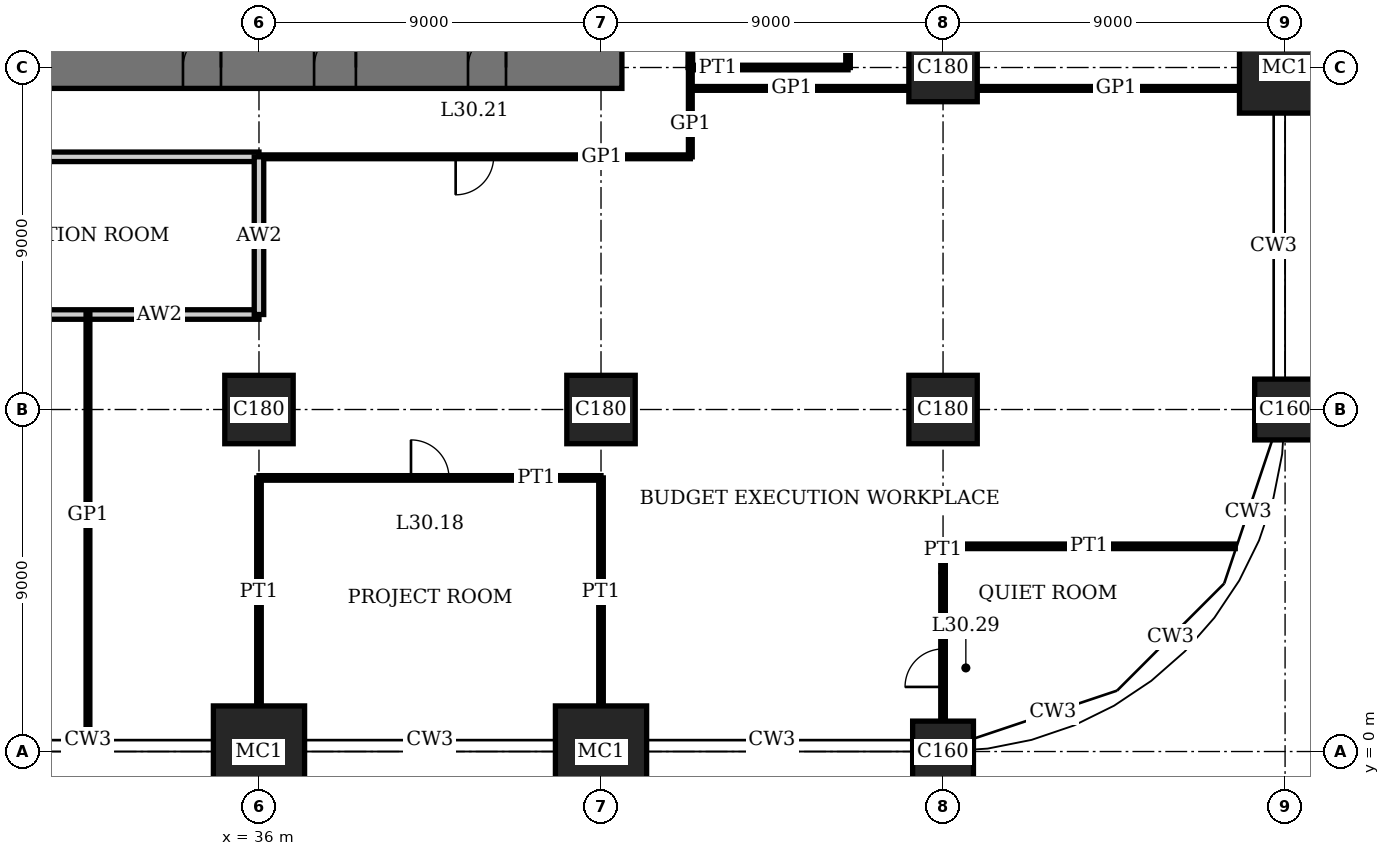
"""IFC4 building model, lengths in metres.
Left out: names, types, materials, properties, quantities, classifications, styles, units other than length and angle.
Written with IfcOpenShell. Run it as: python <this file> out.ifc"""

import sys

from ifc_helpers import new_model, si_unit, direction, frame, frame_2d, origin, origin_2d, place, context, subcontext, project, spatial, rectangle, extrude, element, fill, save


model = new_model("IFC4")
c1 = context("Model", 3, precision=1e-05, world=origin(), true_north=direction((0.0, 1.0)))
c2 = subcontext(c1, "Body", "Model", "MODEL_VIEW")
j1 = project(units=[si_unit("LENGTHUNIT", "METRE"), si_unit("PLANEANGLEUNIT", "RADIAN")], contexts=[c1])
p1 = place(None, origin())
s1 = spatial("IfcSite", under=j1, at=p1, CompositionType="ELEMENT")
p2 = place(p1, origin())
s2 = spatial("IfcBuilding", under=s1, at=p2, CompositionType="ELEMENT")
p3 = place(p2, frame((0.0, 0.0, 125.0)))
s3 = spatial("IfcBuildingStorey", under=s2, at=p3, CompositionType="ELEMENT", Elevation=125.0)
p4 = place(p3, frame((36.0, 0.0, 0.0), z_axis=(0.0, 0.0, 1.0), x_axis=(1.0, 0.0, 0.0)))
e1 = element("IfcColumn", 1, at=p4, inside=s3, PredefinedType="COLUMN", context=c2, shape_type="SweptSolid", body=[
    extrude(rectangle(XDim=2.4, YDim=2.4, at=origin_2d()), origin(), (0.0, 0.0, 1.0), 4.0),
])
p5 = place(p3, frame((36.0, 9.0, 0.0), z_axis=(0.0, 0.0, 1.0), x_axis=(1.0, 0.0, 0.0)))
e2 = element("IfcColumn", 2, at=p5, inside=s3, PredefinedType="COLUMN", context=c2, shape_type="SweptSolid", body=[
    extrude(rectangle(XDim=1.8, YDim=1.8, at=origin_2d()), origin(), (0.0, 0.0, 1.0), 4.0),
])
p6 = place(p3, frame((45.0, 0.0, 0.0), z_axis=(0.0, 0.0, 1.0), x_axis=(1.0, 0.0, 0.0)))
e3 = element("IfcColumn", 3, at=p6, inside=s3, PredefinedType="COLUMN", context=c2, shape_type="SweptSolid", body=[
    extrude(rectangle(XDim=2.4, YDim=2.4, at=origin_2d()), origin(), (0.0, 0.0, 1.0), 4.0),
])
p7 = place(p3, frame((45.0, 9.0, 0.0), z_axis=(0.0, 0.0, 1.0), x_axis=(1.0, 0.0, 0.0)))
e4 = element("IfcColumn", 4, at=p7, inside=s3, PredefinedType="COLUMN", context=c2, shape_type="SweptSolid", body=[
    extrude(rectangle(XDim=1.8, YDim=1.8, at=origin_2d()), origin(), (0.0, 0.0, 1.0), 4.0),
])
p8 = place(p3, frame((54.0, 0.0, 0.0), z_axis=(0.0, 0.0, 1.0), x_axis=(1.0, 0.0, 0.0)))
e5 = element("IfcColumn", 5, at=p8, inside=s3, PredefinedType="COLUMN", context=c2, shape_type="SweptSolid", body=[
    extrude(rectangle(XDim=1.6, YDim=1.6, at=origin_2d()), origin(), (0.0, 0.0, 1.0), 4.0),
])
for number, where, z_axis, x_axis in (
    (6, (54.0, 9.0, 0.0), (0.0, 0.0, 1.0), (1.0, 0.0, 0.0)),
    (7, (54.0, 18.0, 0.0), (0.0, 0.0, 1.0), (1.0, 0.0, 0.0)),
):
    element("IfcColumn", number, at=place(p3, frame(where, z_axis=z_axis, x_axis=x_axis)), inside=s3, PredefinedType="COLUMN", context=c2, shape_type="SweptSolid", body=[
        extrude(rectangle(XDim=1.8, YDim=1.8, at=origin_2d()), origin(), (0.0, 0.0, 1.0), 4.0),
    ])
p9 = place(p3, frame((63.0, 9.0, 0.0), z_axis=(0.0, 0.0, 1.0), x_axis=(1.0, 0.0, 0.0)))
e8 = element("IfcColumn", 8, at=p9, inside=s3, PredefinedType="COLUMN", context=c2, shape_type="SweptSolid", body=[
    extrude(rectangle(XDim=1.6, YDim=1.6, at=origin_2d()), origin(), (0.0, 0.0, 1.0), 4.0),
])
p10 = place(p3, frame((63.0, 18.0, 0.0), z_axis=(0.0, 0.0, 1.0), x_axis=(1.0, 0.0, 0.0)))
e9 = element("IfcColumn", 9, at=p10, inside=s3, PredefinedType="COLUMN", context=c2, shape_type="SweptSolid", body=[
    extrude(rectangle(XDim=2.4, YDim=2.4, at=origin_2d()), origin(), (0.0, 0.0, 1.0), 4.0),
])
p11 = place(p3, frame((17.45, 18.0, 0.0), z_axis=(0.0, 0.0, 1.0), x_axis=(1.0, 0.0, 0.0)))
e10 = element("IfcWall", 10, at=p11, inside=s3, PredefinedType="SHEAR", context=c2, shape_type="SweptSolid", body=[
    extrude(rectangle(XDim=28.1, YDim=1.1, at=frame_2d((14.05, 0.0))), origin(), (0.0, 0.0, 1.0), 4.0),
])
p12 = place(p11, frame((11.55, 0.0, 0.0)))
e11 = element("IfcOpeningElement", 11, at=p12, cuts=e10, PredefinedType="OPENING", context=c2, shape_type="SweptSolid", body=[
    extrude(rectangle(XDim=1.0, YDim=2.4, at=frame_2d((0.5, 1.2))), frame((0.0, 0.56, 0.0), z_axis=(0.0, -1.0, 0.0), x_axis=(1.0, 0.0, 0.0)), (0.0, 0.0, 1.0), 1.12),
])
p13 = place(p11, frame((16.55, 0.0, 0.0)))
e12 = element("IfcOpeningElement", 12, at=p13, cuts=e10, PredefinedType="OPENING", context=c2, shape_type="SweptSolid", body=[
    extrude(rectangle(XDim=1.0, YDim=2.4, at=frame_2d((0.5, 1.2))), frame((0.0, 0.56, 0.0), z_axis=(0.0, -1.0, 0.0), x_axis=(1.0, 0.0, 0.0)), (0.0, 0.0, 1.0), 1.12),
])
p14 = place(p11, frame((20.0, 0.0, 0.0)))
e13 = element("IfcOpeningElement", 13, at=p14, cuts=e10, PredefinedType="OPENING", context=c2, shape_type="SweptSolid", body=[
    extrude(rectangle(XDim=1.1, YDim=2.4, at=frame_2d((0.55, 1.2))), frame((0.0, 0.56, 0.0), z_axis=(0.0, -1.0, 0.0), x_axis=(1.0, 0.0, 0.0)), (0.0, 0.0, 1.0), 1.12),
])
p15 = place(p11, frame((24.05, 0.0, 0.0)))
e14 = element("IfcOpeningElement", 14, at=p15, cuts=e10, PredefinedType="OPENING", context=c2, shape_type="SweptSolid", body=[
    extrude(rectangle(XDim=1.0, YDim=2.4, at=frame_2d((0.5, 1.2))), frame((0.0, 0.56, 0.0), z_axis=(0.0, -1.0, 0.0), x_axis=(1.0, 0.0, 0.0)), (0.0, 0.0, 1.0), 1.12),
])
p16 = place(p3, frame((54.0, 5.4, 0.0), z_axis=(0.0, 0.0, 1.0), x_axis=(1.0, 0.0, 0.0)))
e15 = element("IfcWall", 15, at=p16, inside=s3, PredefinedType="PARTITIONING", context=c2, shape_type="SweptSolid", body=[
    extrude(rectangle(XDim=7.688, YDim=0.12, at=frame_2d((3.844, 0.0))), origin(), (0.0, 0.0, 1.0), 3.75),
])
p17 = place(p3, frame((36.0, 7.2, 0.0), z_axis=(0.0, 0.0, 1.0), x_axis=(1.0, 0.0, 0.0)))
e16 = element("IfcWall", 16, at=p17, inside=s3, PredefinedType="PARTITIONING", context=c2, shape_type="SweptSolid", body=[
    extrude(rectangle(XDim=9.0, YDim=0.12, at=frame_2d((4.5, 0.0))), origin(), (0.0, 0.0, 1.0), 3.75),
])
p18 = place(p17, frame((4.0, 0.0, 0.0)))
e17 = element("IfcOpeningElement", 17, at=p18, cuts=e16, PredefinedType="OPENING", context=c2, shape_type="SweptSolid", body=[
    extrude(rectangle(XDim=1.0, YDim=2.4, at=frame_2d((0.5, 1.2))), frame((0.0, 0.07, 0.0), z_axis=(0.0, -1.0, 0.0), x_axis=(1.0, 0.0, 0.0)), (0.0, 0.0, 1.0), 0.14),
])
p19 = place(p3, frame((22.5, 11.5, 0.0), z_axis=(0.0, 0.0, 1.0), x_axis=(1.0, 0.0, 0.0)))
e18 = element("IfcWall", 18, at=p19, inside=s3, PredefinedType="PARTITIONING", context=c2, shape_type="SweptSolid", body=[
    extrude(rectangle(XDim=13.5, YDim=0.25, at=frame_2d((6.75, 0.0))), origin(), (0.0, 0.0, 1.0), 3.75),
])
p20 = place(p19, frame((5.85, 0.0, 0.0)))
e19 = element("IfcOpeningElement", 19, at=p20, cuts=e18, PredefinedType="OPENING", context=c2, shape_type="SweptSolid", body=[
    extrude(rectangle(XDim=1.8, YDim=2.4, at=frame_2d((0.9, 1.2))), frame((0.0, 0.135, 0.0), z_axis=(0.0, -1.0, 0.0), x_axis=(1.0, 0.0, 0.0)), (0.0, 0.0, 1.0), 0.27),
])
p21 = place(p3, frame((22.5, 15.65, 0.0), z_axis=(0.0, 0.0, 1.0), x_axis=(1.0, 0.0, 0.0)))
e20 = element("IfcWall", 20, at=p21, inside=s3, PredefinedType="PARTITIONING", context=c2, shape_type="SweptSolid", body=[
    extrude(rectangle(XDim=13.5, YDim=0.25, at=frame_2d((6.75, 0.0))), origin(), (0.0, 0.0, 1.0), 3.75),
])
p22 = place(p3, frame((36.0, 15.65, 0.0), z_axis=(0.0, 0.0, 1.0), x_axis=(1.0, 0.0, 0.0)))
e21 = element("IfcWall", 21, at=p22, inside=s3, PredefinedType="PARTITIONING", context=c2, shape_type="SweptSolid", body=[
    extrude(rectangle(XDim=11.35, YDim=0.1, at=frame_2d((5.675, 0.0))), origin(), (0.0, 0.0, 1.0), 3.75),
])
p23 = place(p22, frame((5.175, 0.0, 0.0)))
e22 = element("IfcOpeningElement", 22, at=p23, cuts=e21, PredefinedType="OPENING", context=c2, shape_type="SweptSolid", body=[
    extrude(rectangle(XDim=1.0, YDim=2.4, at=frame_2d((0.5, 1.2))), frame((0.0, 0.06, 0.0), z_axis=(0.0, -1.0, 0.0), x_axis=(1.0, 0.0, 0.0)), (0.0, 0.0, 1.0), 0.12),
])
p24 = place(p3, frame((47.35, 17.45, 0.0), z_axis=(0.0, 0.0, 1.0), x_axis=(1.0, 0.0, 0.0)))
e23 = element("IfcWall", 23, at=p24, inside=s3, PredefinedType="PARTITIONING", context=c2, shape_type="SweptSolid", body=[
    extrude(rectangle(XDim=5.75, YDim=0.1, at=frame_2d((2.875, 0.0))), origin(), (0.0, 0.0, 1.0), 3.75),
])
p25 = place(p3, frame((54.9, 17.45, 0.0), z_axis=(0.0, 0.0, 1.0), x_axis=(1.0, 0.0, 0.0)))
e24 = element("IfcWall", 24, at=p25, inside=s3, PredefinedType="PARTITIONING", context=c2, shape_type="SweptSolid", body=[
    extrude(rectangle(XDim=6.9, YDim=0.1, at=frame_2d((3.45, 0.0))), origin(), (0.0, 0.0, 1.0), 3.75),
])
p26 = place(p3, frame((47.35, 18.0, 0.0), z_axis=(0.0, 0.0, 1.0), x_axis=(1.0, 0.0, 0.0)))
e25 = element("IfcWall", 25, at=p26, inside=s3, PredefinedType="PARTITIONING", context=c2, shape_type="SweptSolid", body=[
    extrude(rectangle(XDim=4.15, YDim=0.12, at=frame_2d((2.075, 0.0))), origin(), (0.0, 0.0, 1.0), 3.05),
])
p27 = place(p3, frame((31.5, 0.31, 0.0), z_axis=(0.0, 0.0, 1.0), x_axis=(0.0, 1.0, 0.0)))
e26 = element("IfcWall", 26, at=p27, inside=s3, PredefinedType="PARTITIONING", context=c2, shape_type="SweptSolid", body=[
    extrude(rectangle(XDim=11.2, YDim=0.1, at=frame_2d((5.6, 0.0))), origin(), (0.0, 0.0, 1.0), 3.75),
])
p28 = place(p3, frame((36.0, 11.5, 0.0), z_axis=(0.0, 0.0, 1.0), x_axis=(0.0, 1.0, 0.0)))
e27 = element("IfcWall", 27, at=p28, inside=s3, PredefinedType="PARTITIONING", context=c2, shape_type="SweptSolid", body=[
    extrude(rectangle(XDim=4.15, YDim=0.25, at=frame_2d((2.075, 0.0))), origin(), (0.0, 0.0, 1.0), 3.05),
])
for number, where, z_axis, x_axis in (
    (28, (36.0, 1.2, 0.0), (0.0, 0.0, 1.0), (0.0, 1.0, 0.0)),
    (29, (45.0, 1.2, 0.0), (0.0, 0.0, 1.0), (0.0, 1.0, 0.0)),
):
    element("IfcWall", number, at=place(p3, frame(where, z_axis=z_axis, x_axis=x_axis)), inside=s3, PredefinedType="PARTITIONING", context=c2, shape_type="SweptSolid", body=[
        extrude(rectangle(XDim=6.0, YDim=0.12, at=frame_2d((3.0, 0.0))), origin(), (0.0, 0.0, 1.0), 3.05),
    ])
p29 = place(p3, frame((47.35, 18.0, 0.0), z_axis=(0.0, 0.0, 1.0), x_axis=(0.0, 1.0, 0.0)))
e30 = element("IfcWall", 30, at=p29, inside=s3, PredefinedType="PARTITIONING", context=c2, shape_type="SweptSolid", body=[
    extrude(rectangle(XDim=4.5, YDim=0.12, at=frame_2d((2.25, 0.0))), origin(), (0.0, 0.0, 1.0), 3.75),
])
p30 = place(p3, frame((47.35, 15.65, 0.0), z_axis=(0.0, 0.0, 1.0), x_axis=(0.0, 1.0, 0.0)))
e31 = element("IfcWall", 31, at=p30, inside=s3, PredefinedType="PARTITIONING", context=c2, shape_type="SweptSolid", body=[
    extrude(rectangle(XDim=2.35, YDim=0.1, at=frame_2d((1.175, 0.0))), origin(), (0.0, 0.0, 1.0), 3.75),
])
p31 = place(p3, frame((51.5, 18.0, 0.0), z_axis=(0.0, 0.0, 1.0), x_axis=(0.0, 1.0, 0.0)))
e32 = element("IfcWall", 32, at=p31, inside=s3, PredefinedType="PARTITIONING", context=c2, shape_type="SweptSolid", body=[
    extrude(rectangle(XDim=4.5, YDim=0.12, at=frame_2d((2.25, 0.0))), origin(), (0.0, 0.0, 1.0), 3.75),
])
p32 = place(p31, frame((1.75, 0.0, 0.0)))
e33 = element("IfcOpeningElement", 33, at=p32, cuts=e32, PredefinedType="OPENING", context=c2, shape_type="SweptSolid", body=[
    extrude(rectangle(XDim=1.0, YDim=2.4, at=frame_2d((0.5, 1.2))), frame((0.0, 0.07, 0.0), z_axis=(0.0, -1.0, 0.0), x_axis=(1.0, 0.0, 0.0)), (0.0, 0.0, 1.0), 0.14),
])
p33 = place(p3, frame((54.0, 0.8, 0.0), z_axis=(0.0, 0.0, 1.0), x_axis=(0.0, 1.0, 0.0)))
e34 = element("IfcWall", 34, at=p33, inside=s3, PredefinedType="PARTITIONING", context=c2, shape_type="SweptSolid", body=[
    extrude(rectangle(XDim=4.6, YDim=0.12, at=frame_2d((2.3, 0.0))), origin(), (0.0, 0.0, 1.0), 3.05),
])
p34 = place(p33, frame((0.9, 0.0, 0.0)))
e35 = element("IfcOpeningElement", 35, at=p34, cuts=e34, PredefinedType="OPENING", context=c2, shape_type="SweptSolid", body=[
    extrude(rectangle(XDim=1.0, YDim=2.4, at=frame_2d((0.5, 1.2))), frame((0.0, 0.07, 0.0), z_axis=(0.0, -1.0, 0.0), x_axis=(1.0, 0.0, 0.0)), (0.0, 0.0, 1.0), 0.14),
])
p35 = place(p13, origin())
e36 = element("IfcDoor", 36, at=p35, inside=s3, OperationType="SINGLE_SWING_LEFT", PredefinedType="DOOR", context=c2, shape_type="SweptSolid", body=[
    extrude(rectangle(XDim=1.0, YDim=2.4, at=frame_2d((0.5, 1.2))), frame((0.0, 0.025, 0.0), z_axis=(0.0, -1.0, 0.0), x_axis=(1.0, 0.0, 0.0)), (0.0, 0.0, 1.0), 0.05),
    extrude(rectangle(XDim=0.04, YDim=2.4, at=frame_2d((0.02, 1.2))), frame((0.0, 0.4, 0.0), z_axis=(0.0, -1.0, 0.0), x_axis=(1.0, 0.0, 0.0)), (0.0, 0.0, 1.0), 0.8),
    extrude(rectangle(XDim=0.04, YDim=2.4, at=frame_2d((0.98, 1.2))), frame((0.0, 0.4, 0.0), z_axis=(0.0, -1.0, 0.0), x_axis=(1.0, 0.0, 0.0)), (0.0, 0.0, 1.0), 0.8),
    extrude(rectangle(XDim=1.0, YDim=0.04, at=frame_2d((0.5, 2.38))), frame((0.0, 0.4, 0.0), z_axis=(0.0, -1.0, 0.0), x_axis=(1.0, 0.0, 0.0)), (0.0, 0.0, 1.0), 0.8),
])
fill(e12, e36)
p36 = place(p14, origin())
e37 = element("IfcDoor", 37, at=p36, inside=s3, OperationType="SINGLE_SWING_LEFT", PredefinedType="DOOR", context=c2, shape_type="SweptSolid", body=[
    extrude(rectangle(XDim=1.1, YDim=2.4, at=frame_2d((0.55, 1.2))), frame((0.0, 0.025, 0.0), z_axis=(0.0, -1.0, 0.0), x_axis=(1.0, 0.0, 0.0)), (0.0, 0.0, 1.0), 0.05),
    extrude(rectangle(XDim=0.04, YDim=2.4, at=frame_2d((0.02, 1.2))), frame((0.0, 0.44, 0.0), z_axis=(0.0, -1.0, 0.0), x_axis=(1.0, 0.0, 0.0)), (0.0, 0.0, 1.0), 0.88),
    extrude(rectangle(XDim=0.04, YDim=2.4, at=frame_2d((1.08, 1.2))), frame((0.0, 0.44, 0.0), z_axis=(0.0, -1.0, 0.0), x_axis=(1.0, 0.0, 0.0)), (0.0, 0.0, 1.0), 0.88),
    extrude(rectangle(XDim=1.1, YDim=0.04, at=frame_2d((0.55, 2.38))), frame((0.0, 0.44, 0.0), z_axis=(0.0, -1.0, 0.0), x_axis=(1.0, 0.0, 0.0)), (0.0, 0.0, 1.0), 0.88),
])
fill(e13, e37)
p37 = place(p15, origin())
e38 = element("IfcDoor", 38, at=p37, inside=s3, OperationType="SINGLE_SWING_LEFT", PredefinedType="DOOR", context=c2, shape_type="SweptSolid", body=[
    extrude(rectangle(XDim=1.0, YDim=2.4, at=frame_2d((0.5, 1.2))), frame((0.0, 0.025, 0.0), z_axis=(0.0, -1.0, 0.0), x_axis=(1.0, 0.0, 0.0)), (0.0, 0.0, 1.0), 0.05),
    extrude(rectangle(XDim=0.04, YDim=2.4, at=frame_2d((0.02, 1.2))), frame((0.0, 0.4, 0.0), z_axis=(0.0, -1.0, 0.0), x_axis=(1.0, 0.0, 0.0)), (0.0, 0.0, 1.0), 0.8),
    extrude(rectangle(XDim=0.04, YDim=2.4, at=frame_2d((0.98, 1.2))), frame((0.0, 0.4, 0.0), z_axis=(0.0, -1.0, 0.0), x_axis=(1.0, 0.0, 0.0)), (0.0, 0.0, 1.0), 0.8),
    extrude(rectangle(XDim=1.0, YDim=0.04, at=frame_2d((0.5, 2.38))), frame((0.0, 0.4, 0.0), z_axis=(0.0, -1.0, 0.0), x_axis=(1.0, 0.0, 0.0)), (0.0, 0.0, 1.0), 0.8),
])
fill(e14, e38)
p38 = place(p18, origin())
e39 = element("IfcDoor", 39, at=p38, inside=s3, OperationType="SINGLE_SWING_RIGHT", PredefinedType="DOOR", context=c2, shape_type="SweptSolid", body=[
    extrude(rectangle(XDim=1.0, YDim=2.4, at=frame_2d((0.5, 1.2))), frame((0.0, 0.025, 0.0), z_axis=(0.0, -1.0, 0.0), x_axis=(1.0, 0.0, 0.0)), (0.0, 0.0, 1.0), 0.05),
])
fill(e17, e39)
p39 = place(p23, origin())
e40 = element("IfcDoor", 40, at=p39, inside=s3, OperationType="SINGLE_SWING_LEFT", PredefinedType="DOOR", context=c2, shape_type="SweptSolid", body=[
    extrude(rectangle(XDim=1.0, YDim=2.4, at=frame_2d((0.5, 1.2))), frame((0.0, 0.02, 0.0), z_axis=(0.0, -1.0, 0.0), x_axis=(1.0, 0.0, 0.0)), (0.0, 0.0, 1.0), 0.04),
])
fill(e22, e40)
p40 = place(p34, origin())
e41 = element("IfcDoor", 41, at=p40, inside=s3, OperationType="SINGLE_SWING_RIGHT", PredefinedType="DOOR", context=c2, shape_type="SweptSolid", body=[
    extrude(rectangle(XDim=1.0, YDim=2.4, at=frame_2d((0.5, 1.2))), frame((0.0, 0.025, 0.0), z_axis=(0.0, -1.0, 0.0), x_axis=(1.0, 0.0, 0.0)), (0.0, 0.0, 1.0), 0.05),
])
fill(e35, e41)
save(model, sys.argv[1])
